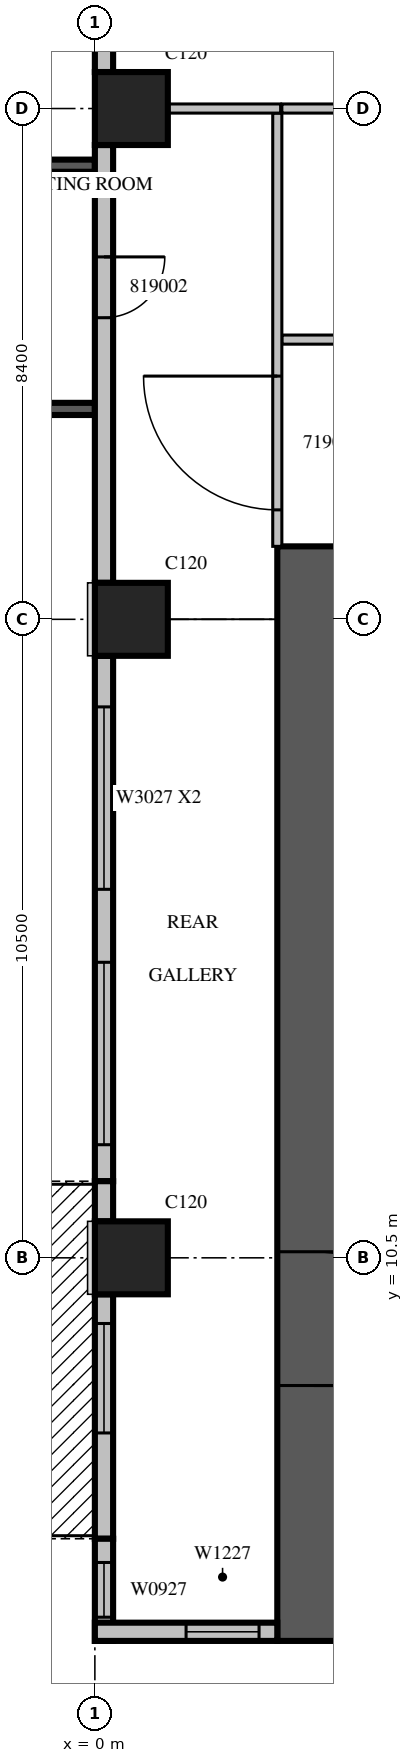
"""IFC4 building model, lengths in metres.
Left out: names, types, materials, properties, quantities, classifications, styles, units other than length and angle.
Written with IfcOpenShell. Run it as: python <this file> out.ifc"""

import sys

from ifc_helpers import new_model, si_unit, direction, frame, frame_2d, origin, origin_2d, place, context, subcontext, project, spatial, rectangle, extrude, source, transform, mapped, element, fill, save


model = new_model("IFC4")
c1 = context("Model", 3, precision=1e-05, world=origin(), true_north=direction((0.0, 1.0)))
c2 = subcontext(c1, "Body", "Model", "MODEL_VIEW")
j1 = project(units=[si_unit("LENGTHUNIT", "METRE"), si_unit("PLANEANGLEUNIT", "RADIAN")], contexts=[c1])
p1 = place(None, origin())
s1 = spatial("IfcSite", under=j1, at=p1, CompositionType="ELEMENT")
p2 = place(p1, origin())
s2 = spatial("IfcBuilding", under=s1, at=p2, CompositionType="ELEMENT")
p3 = place(p2, frame((0.0, 0.0, 90.9)))
s3 = spatial("IfcBuildingStorey", under=s2, at=p3, CompositionType="ELEMENT", Elevation=90.9)
m1 = source(origin(), c2, "Body", "SweptSolid", [
    extrude(rectangle(XDim=1.2, YDim=1.2, at=origin_2d()), origin(), (0.0, 0.0, 1.0), 4.2),
])
for number, where, z_axis, x_axis in (
    (1, (0.6, 10.5, 0.0), (0.0, 0.0, 1.0), (1.0, 0.0, 0.0)),
    (2, (0.6, 21.0, 0.0), (0.0, 0.0, 1.0), (1.0, 0.0, 0.0)),
    (3, (0.6, 29.4, 0.0), (0.0, 0.0, 1.0), (1.0, 0.0, 0.0)),
):
    element("IfcColumn", number, at=place(p3, frame(where, z_axis=z_axis, x_axis=x_axis)), inside=s3, PredefinedType="COLUMN", context=c2, shape_type="MappedRepresentation", body=[
        mapped(m1, transform((0.0, 0.0, 0.0), scale=1.0)),
    ])
m2 = source(origin(), c2, "Body", "SweptSolid", [
    extrude(rectangle(XDim=18.0, YDim=1.2, at=frame_2d((9.0, 0.0))), origin(), (0.0, 0.0, 1.0), 4.2),
])
p4 = place(p3, frame((3.6, 4.2, 0.0), z_axis=(0.0, 0.0, 1.0), x_axis=(0.0, 1.0, 0.0)))
e4 = element("IfcWall", 4, at=p4, inside=s3, PredefinedType="SHEAR", context=c2, shape_type="MappedRepresentation", body=[
    mapped(m2, transform((0.0, 0.0, 0.0), scale=1.0)),
])
m3 = source(origin(), c2, "Body", "SweptSolid", [
    extrude(rectangle(XDim=2.2, YDim=2.1, at=frame_2d((1.1, 1.05))), frame((0.0, 0.61, 0.0), z_axis=(0.0, -1.0, 0.0), x_axis=(1.0, 0.0, 0.0)), (0.0, 0.0, 1.0), 1.22),
])
p5 = place(p4, frame((4.2, 0.0, 0.0)))
e5 = element("IfcOpeningElement", 5, at=p5, cuts=e4, PredefinedType="OPENING", context=c2, shape_type="MappedRepresentation", body=[
    mapped(m3, transform((0.0, 0.0, 0.0), scale=1.0)),
])
m4 = source(origin(), c2, "Body", "SweptSolid", [
    extrude(rectangle(XDim=3.9, YDim=0.2, at=frame_2d((1.95, 0.0))), origin(), (0.0, 0.0, 1.0), 3.8),
])
p6 = place(p3, frame((0.0, 28.46, 0.0), z_axis=(0.0, 0.0, 1.0), x_axis=(-1.0, 0.0, 0.0)))
e6 = element("IfcWall", 6, at=p6, inside=s3, PredefinedType="SOLIDWALL", context=c2, shape_type="MappedRepresentation", body=[
    mapped(m4, transform((0.0, 0.0, 0.0), scale=1.0)),
])
m5 = source(origin(), c2, "Body", "SweptSolid", [
    extrude(rectangle(XDim=2.4, YDim=2.7, at=frame_2d((1.2, 1.35))), frame((0.0, 0.11, 0.0), z_axis=(0.0, -1.0, 0.0), x_axis=(1.0, 0.0, 0.0)), (0.0, 0.0, 1.0), 0.22),
])
p7 = place(p6, frame((0.75, 0.0, 0.6)))
e7 = element("IfcOpeningElement", 7, at=p7, cuts=e6, PredefinedType="OPENING", context=c2, shape_type="MappedRepresentation", body=[
    mapped(m5, transform((0.0, 0.0, 0.0), scale=1.0)),
])
p8 = place(p3, frame((0.0, 24.46, 0.0), z_axis=(0.0, 0.0, 1.0), x_axis=(-1.0, 0.0, 0.0)))
e8 = element("IfcWall", 8, at=p8, inside=s3, PredefinedType="SOLIDWALL", context=c2, shape_type="MappedRepresentation", body=[
    mapped(m4, transform((0.0, 0.0, 0.0), scale=1.0)),
])
p9 = place(p8, frame((0.75, 0.0, 0.6)))
e9 = element("IfcOpeningElement", 9, at=p9, cuts=e8, PredefinedType="OPENING", context=c2, shape_type="MappedRepresentation", body=[
    mapped(m5, transform((0.0, 0.0, 0.0), scale=1.0)),
])
m6 = source(origin(), c2, "Body", "SweptSolid", [
    extrude(rectangle(XDim=7.2, YDim=0.3, at=frame_2d((3.6, 0.0))), origin(), (0.0, 0.0, 1.0), 3.8),
])
p10 = place(p3, frame((0.15, 37.2, 0.0), z_axis=(0.0, 0.0, 1.0), x_axis=(0.0, -1.0, 0.0)))
e10 = element("IfcWall", 10, at=p10, inside=s3, PredefinedType="STANDARD", context=c2, shape_type="MappedRepresentation", body=[
    mapped(m6, transform((0.0, 0.0, 0.0), scale=1.0)),
])
m7 = source(origin(), c2, "Body", "SweptSolid", [
    extrude(rectangle(XDim=1.8, YDim=2.7, at=frame_2d((0.9, 1.35))), frame((0.0, 0.16, 0.0), z_axis=(0.0, -1.0, 0.0), x_axis=(1.0, 0.0, 0.0)), (0.0, 0.0, 1.0), 0.32),
])
p11 = place(p10, frame((1.008, 0.0, 0.6)))
e11 = element("IfcOpeningElement", 11, at=p11, cuts=e10, PredefinedType="OPENING", context=c2, shape_type="MappedRepresentation", body=[
    mapped(m7, transform((0.0, 0.0, 0.0), scale=1.0)),
])
p12 = place(p10, frame((4.104, 0.0, 0.6)))
e12 = element("IfcOpeningElement", 12, at=p12, cuts=e10, PredefinedType="OPENING", context=c2, shape_type="MappedRepresentation", body=[
    mapped(m7, transform((0.0, 0.0, 0.0), scale=1.0)),
])
p13 = place(p3, frame((0.15, 28.8, 0.0), z_axis=(0.0, 0.0, 1.0), x_axis=(0.0, -1.0, 0.0)))
e13 = element("IfcWall", 13, at=p13, inside=s3, PredefinedType="STANDARD", context=c2, shape_type="MappedRepresentation", body=[
    mapped(m6, transform((0.0, 0.0, 0.0), scale=1.0)),
])
m8 = source(origin(), c2, "Body", "SweptSolid", [
    extrude(rectangle(XDim=1.0, YDim=2.1, at=frame_2d((0.5, 1.05))), frame((0.0, 0.16, 0.0), z_axis=(0.0, -1.0, 0.0), x_axis=(1.0, 0.0, 0.0)), (0.0, 0.0, 1.0), 0.32),
])
p14 = place(p13, frame((1.84, 0.0, 0.0)))
e14 = element("IfcOpeningElement", 14, at=p14, cuts=e13, PredefinedType="OPENING", context=c2, shape_type="MappedRepresentation", body=[
    mapped(m8, transform((0.0, 0.0, 0.0), scale=1.0)),
])
m9 = source(origin(), c2, "Body", "SweptSolid", [
    extrude(rectangle(XDim=8.64, YDim=0.3, at=frame_2d((4.32, 0.0))), origin(), (0.0, 0.0, 1.0), 3.8),
])
p15 = place(p3, frame((0.15, 20.4, 0.0), z_axis=(0.0, 0.0, 1.0), x_axis=(0.0, -1.0, 0.0)))
e15 = element("IfcWall", 15, at=p15, inside=s3, PredefinedType="STANDARD", context=c2, shape_type="MappedRepresentation", body=[
    mapped(m9, transform((0.0, 0.0, 0.0), scale=1.0)),
])
m10 = source(origin(), c2, "Body", "SweptSolid", [
    extrude(rectangle(XDim=3.0, YDim=2.7, at=frame_2d((1.5, 1.35))), frame((0.0, 0.16, 0.0), z_axis=(0.0, -1.0, 0.0), x_axis=(1.0, 0.0, 0.0)), (0.0, 0.0, 1.0), 0.32),
])
p16 = place(p15, frame((0.84, 0.0, 0.6)))
e16 = element("IfcOpeningElement", 16, at=p16, cuts=e15, PredefinedType="OPENING", context=c2, shape_type="MappedRepresentation", body=[
    mapped(m10, transform((0.0, 0.0, 0.0), scale=1.0)),
])
p17 = place(p15, frame((5.04, 0.0, 0.6)))
e17 = element("IfcOpeningElement", 17, at=p17, cuts=e15, PredefinedType="OPENING", context=c2, shape_type="MappedRepresentation", body=[
    mapped(m10, transform((0.0, 0.0, 0.0), scale=1.0)),
])
m11 = source(origin(), c2, "Body", "SweptSolid", [
    extrude(rectangle(XDim=0.66, YDim=0.3, at=frame_2d((0.33, 0.0))), origin(), (0.0, 0.0, 1.0), 3.8),
])
p18 = place(p3, frame((0.15, 11.76, 0.0), z_axis=(0.0, 0.0, 1.0), x_axis=(0.0, -1.0, 0.0)))
e18 = element("IfcWall", 18, at=p18, inside=s3, PredefinedType="STANDARD", context=c2, shape_type="MappedRepresentation", body=[
    mapped(m11, transform((0.0, 0.0, 0.0), scale=1.0)),
])
m12 = source(origin(), c2, "Body", "SweptSolid", [
    extrude(rectangle(XDim=4.02, YDim=0.3, at=frame_2d((2.01, 0.0))), origin(), (0.0, 0.0, 1.0), 3.8),
])
p19 = place(p3, frame((0.15, 9.9, 0.0), z_axis=(0.0, 0.0, 1.0), x_axis=(0.0, -1.0, 0.0)))
e19 = element("IfcWall", 19, at=p19, inside=s3, PredefinedType="STANDARD", context=c2, shape_type="MappedRepresentation", body=[
    mapped(m12, transform((0.0, 0.0, 0.0), scale=1.0)),
])
m13 = source(origin(), c2, "Body", "SweptSolid", [
    extrude(rectangle(XDim=1.8, YDim=2.4, at=frame_2d((0.9, 1.2))), frame((0.0, 0.16, 0.0), z_axis=(0.0, -1.0, 0.0), x_axis=(1.0, 0.0, 0.0)), (0.0, 0.0, 1.0), 0.32),
])
p20 = place(p19, frame((0.48, 0.0, 0.0)))
e20 = element("IfcOpeningElement", 20, at=p20, cuts=e19, PredefinedType="OPENING", context=c2, shape_type="MappedRepresentation", body=[
    mapped(m13, transform((0.0, 0.0, 0.0), scale=1.0)),
])
m14 = source(origin(), c2, "Body", "SweptSolid", [
    extrude(rectangle(XDim=1.68, YDim=0.3, at=frame_2d((0.84, 0.0))), origin(), (0.0, 0.0, 1.0), 3.8),
])
p21 = place(p3, frame((0.15, 5.88, 0.0), z_axis=(0.0, 0.0, 1.0), x_axis=(0.0, -1.0, 0.0)))
e21 = element("IfcWall", 21, at=p21, inside=s3, PredefinedType="STANDARD", context=c2, shape_type="MappedRepresentation", body=[
    mapped(m14, transform((0.0, 0.0, 0.0), scale=1.0)),
])
m15 = source(origin(), c2, "Body", "SweptSolid", [
    extrude(rectangle(XDim=0.9, YDim=2.7, at=frame_2d((0.45, 1.35))), frame((0.0, 0.16, 0.0), z_axis=(0.0, -1.0, 0.0), x_axis=(1.0, 0.0, 0.0)), (0.0, 0.0, 1.0), 0.32),
])
p22 = place(p21, frame((0.39, 0.0, 0.6)))
e22 = element("IfcOpeningElement", 22, at=p22, cuts=e21, PredefinedType="OPENING", context=c2, shape_type="MappedRepresentation", body=[
    mapped(m15, transform((0.0, 0.0, 0.0), scale=1.0)),
])
m16 = source(origin(), c2, "Body", "SweptSolid", [
    extrude(rectangle(XDim=3.0, YDim=0.3, at=frame_2d((1.5, 0.0))), origin(), (0.0, 0.0, 1.0), 3.8),
])
p23 = place(p3, frame((0.0, 4.35, 0.0), z_axis=(0.0, 0.0, 1.0), x_axis=(1.0, 0.0, 0.0)))
e23 = element("IfcWall", 23, at=p23, inside=s3, PredefinedType="STANDARD", context=c2, shape_type="MappedRepresentation", body=[
    mapped(m16, transform((0.0, 0.0, 0.0), scale=1.0)),
])
m17 = source(origin(), c2, "Body", "SweptSolid", [
    extrude(rectangle(XDim=1.2, YDim=2.7, at=frame_2d((0.6, 1.35))), frame((0.0, 0.16, 0.0), z_axis=(0.0, -1.0, 0.0), x_axis=(1.0, 0.0, 0.0)), (0.0, 0.0, 1.0), 0.32),
])
p24 = place(p23, frame((1.5, 0.0, 0.6)))
e24 = element("IfcOpeningElement", 24, at=p24, cuts=e23, PredefinedType="OPENING", context=c2, shape_type="MappedRepresentation", body=[
    mapped(m17, transform((0.0, 0.0, 0.0), scale=1.0)),
])
m18 = source(origin(), c2, "Body", "SweptSolid", [
    extrude(rectangle(XDim=11.925, YDim=0.15, at=frame_2d((5.963, 0.0))), origin(), (0.0, 0.0, 1.0), 3.8),
])
p25 = place(p3, frame((3.075, 25.6, 0.0), z_axis=(0.0, 0.0, 1.0), x_axis=(1.0, 0.0, 0.0)))
e25 = element("IfcWall", 25, at=p25, inside=s3, PredefinedType="PARTITIONING", context=c2, shape_type="MappedRepresentation", body=[
    mapped(m18, transform((0.0, 0.0, 0.0), scale=1.0)),
])
m19 = source(origin(), c2, "Body", "SweptSolid", [
    extrude(rectangle(XDim=0.9, YDim=2.1, at=frame_2d((0.45, 1.05))), frame((0.0, 0.085, 0.0), z_axis=(0.0, -1.0, 0.0), x_axis=(1.0, 0.0, 0.0)), (0.0, 0.0, 1.0), 0.17),
])
p26 = place(p25, frame((1.462, 0.0, 0.0)))
e26 = element("IfcOpeningElement", 26, at=p26, cuts=e25, PredefinedType="OPENING", context=c2, shape_type="MappedRepresentation", body=[
    mapped(m19, transform((0.0, 0.0, 0.0), scale=1.0)),
])
p27 = place(p25, frame((8.3, 0.0, 0.0)))
e27 = element("IfcOpeningElement", 27, at=p27, cuts=e25, PredefinedType="OPENING", context=c2, shape_type="MappedRepresentation", body=[
    mapped(m19, transform((0.0, 0.0, 0.0), scale=1.0)),
])
m20 = source(origin(), c2, "Body", "SweptSolid", [
    extrude(rectangle(XDim=6.826, YDim=0.15, at=frame_2d((3.413, 0.0))), origin(), (0.0, 0.0, 1.0), 3.8),
])
p28 = place(p3, frame((9.901, 29.4, 0.0), z_axis=(0.0, 0.0, 1.0), x_axis=(-1.0, 0.0, 0.0)))
e28 = element("IfcWall", 28, at=p28, inside=s3, PredefinedType="PARTITIONING", context=c2, shape_type="MappedRepresentation", body=[
    mapped(m20, transform((0.0, 0.0, 0.0), scale=1.0)),
])
m21 = source(origin(), c2, "Body", "SweptSolid", [
    extrude(rectangle(XDim=7.125, YDim=0.15, at=frame_2d((3.562, 0.0))), origin(), (0.0, 0.0, 1.0), 3.8),
])
p29 = place(p3, frame((3.0, 29.325, 0.0), z_axis=(0.0, 0.0, 1.0), x_axis=(0.0, -1.0, 0.0)))
e29 = element("IfcWall", 29, at=p29, inside=s3, PredefinedType="PARTITIONING", context=c2, shape_type="MappedRepresentation", body=[
    mapped(m21, transform((0.0, 0.0, 0.0), scale=1.0)),
])
m22 = source(origin(), c2, "Body", "SweptSolid", [
    extrude(rectangle(XDim=2.2, YDim=2.1, at=frame_2d((1.1, 1.05))), frame((0.0, 0.085, 0.0), z_axis=(0.0, -1.0, 0.0), x_axis=(1.0, 0.0, 0.0)), (0.0, 0.0, 1.0), 0.17),
])
p30 = place(p29, frame((4.325, 0.0, 0.0)))
e30 = element("IfcOpeningElement", 30, at=p30, cuts=e29, PredefinedType="OPENING", context=c2, shape_type="MappedRepresentation", body=[
    mapped(m22, transform((0.0, 0.0, 0.0), scale=1.0)),
])
m23 = source(origin(), c2, "Body", "SweptSolid", [
    extrude(rectangle(XDim=1.856, YDim=0.15, at=frame_2d((0.928, 0.0))), origin(), (0.0, 0.0, 1.0), 3.8),
])
p31 = place(p3, frame((3.055, 29.4, 0.0), z_axis=(0.0, 0.0, 1.0), x_axis=(-1.0, 0.0, 0.0)))
e31 = element("IfcWall", 31, at=p31, inside=s3, PredefinedType="PARTITIONING", context=c2, shape_type="MappedRepresentation", body=[
    mapped(m23, transform((0.0, 0.0, 0.0), scale=1.0)),
])
m24 = source(origin(), c2, "Body", "SweptSolid", [
    extrude(rectangle(XDim=3.0, YDim=2.7, at=frame_2d((1.5, 1.35))), frame((0.0, 0.03, 0.0), z_axis=(0.0, -1.0, 0.0), x_axis=(1.0, 0.0, 0.0)), (0.0, 0.0, 1.0), 0.06),
])
p32 = place(p16, origin())
e32 = element("IfcWindow", 32, at=p32, inside=s3, PartitioningType="SINGLE_PANEL", PredefinedType="WINDOW", context=c2, shape_type="MappedRepresentation", body=[
    mapped(m24, transform((0.0, 0.0, 0.0), scale=1.0)),
])
fill(e16, e32)
p33 = place(p17, origin())
e33 = element("IfcWindow", 33, at=p33, inside=s3, PartitioningType="SINGLE_PANEL", PredefinedType="WINDOW", context=c2, shape_type="MappedRepresentation", body=[
    mapped(m24, transform((0.0, 0.0, 0.0), scale=1.0)),
])
fill(e17, e33)
m25 = source(origin(), c2, "Body", "SweptSolid", [
    extrude(rectangle(XDim=1.8, YDim=2.4, at=frame_2d((0.9, 1.2))), frame((0.0, 0.025, 0.0), z_axis=(0.0, -1.0, 0.0), x_axis=(1.0, 0.0, 0.0)), (0.0, 0.0, 1.0), 0.05),
])
p34 = place(p20, origin())
e34 = element("IfcDoor", 34, at=p34, inside=s3, OperationType="SLIDING_TO_LEFT", PredefinedType="DOOR", context=c2, shape_type="MappedRepresentation", body=[
    mapped(m25, transform((0.0, 0.0, 0.0), scale=1.0)),
])
fill(e20, e34)
m26 = source(origin(), c2, "Body", "SweptSolid", [
    extrude(rectangle(XDim=0.9, YDim=2.7, at=frame_2d((0.45, 1.35))), frame((0.0, 0.03, 0.0), z_axis=(0.0, -1.0, 0.0), x_axis=(1.0, 0.0, 0.0)), (0.0, 0.0, 1.0), 0.06),
])
p35 = place(p22, origin())
e35 = element("IfcWindow", 35, at=p35, inside=s3, PartitioningType="SINGLE_PANEL", PredefinedType="WINDOW", context=c2, shape_type="MappedRepresentation", body=[
    mapped(m26, transform((0.0, 0.0, 0.0), scale=1.0)),
])
fill(e22, e35)
m27 = source(origin(), c2, "Body", "SweptSolid", [
    extrude(rectangle(XDim=1.2, YDim=2.7, at=frame_2d((0.6, 1.35))), frame((0.0, 0.03, 0.0), z_axis=(0.0, -1.0, 0.0), x_axis=(1.0, 0.0, 0.0)), (0.0, 0.0, 1.0), 0.06),
])
p36 = place(p24, origin())
e36 = element("IfcWindow", 36, at=p36, inside=s3, PartitioningType="SINGLE_PANEL", PredefinedType="WINDOW", context=c2, shape_type="MappedRepresentation", body=[
    mapped(m27, transform((0.0, 0.0, 0.0), scale=1.0)),
])
fill(e24, e36)
m28 = source(origin(), c2, "Body", "SweptSolid", [
    extrude(rectangle(XDim=2.2, YDim=2.1, at=frame_2d((1.1, 1.05))), frame((0.0, 0.025, 0.0), z_axis=(0.0, -1.0, 0.0), x_axis=(1.0, 0.0, 0.0)), (0.0, 0.0, 1.0), 0.05),
])
p37 = place(p5, origin())
e37 = element("IfcDoor", 37, at=p37, inside=s3, OperationType="DOUBLE_DOOR_SINGLE_SWING", PredefinedType="DOOR", context=c2, shape_type="MappedRepresentation", body=[
    mapped(m28, transform((0.0, 0.0, 0.0), scale=1.0)),
])
fill(e5, e37)
p38 = place(p30, origin())
e38 = element("IfcDoor", 38, at=p38, inside=s3, OperationType="DOUBLE_DOOR_SINGLE_SWING", PredefinedType="DOOR", context=c2, shape_type="MappedRepresentation", body=[
    mapped(m28, transform((0.0, 0.0, 0.0), scale=1.0)),
])
fill(e30, e38)
m29 = source(origin(), c2, "Body", "SweptSolid", [
    extrude(rectangle(XDim=1.0, YDim=2.1, at=frame_2d((0.5, 1.05))), frame((0.0, 0.025, 0.0), z_axis=(0.0, -1.0, 0.0), x_axis=(1.0, 0.0, 0.0)), (0.0, 0.0, 1.0), 0.05),
])
p39 = place(p14, origin())
e39 = element("IfcDoor", 39, at=p39, inside=s3, OperationType="SINGLE_SWING_LEFT", PredefinedType="DOOR", context=c2, shape_type="MappedRepresentation", body=[
    mapped(m29, transform((0.0, 0.0, 0.0), scale=1.0)),
])
fill(e14, e39)
save(model, sys.argv[1])
